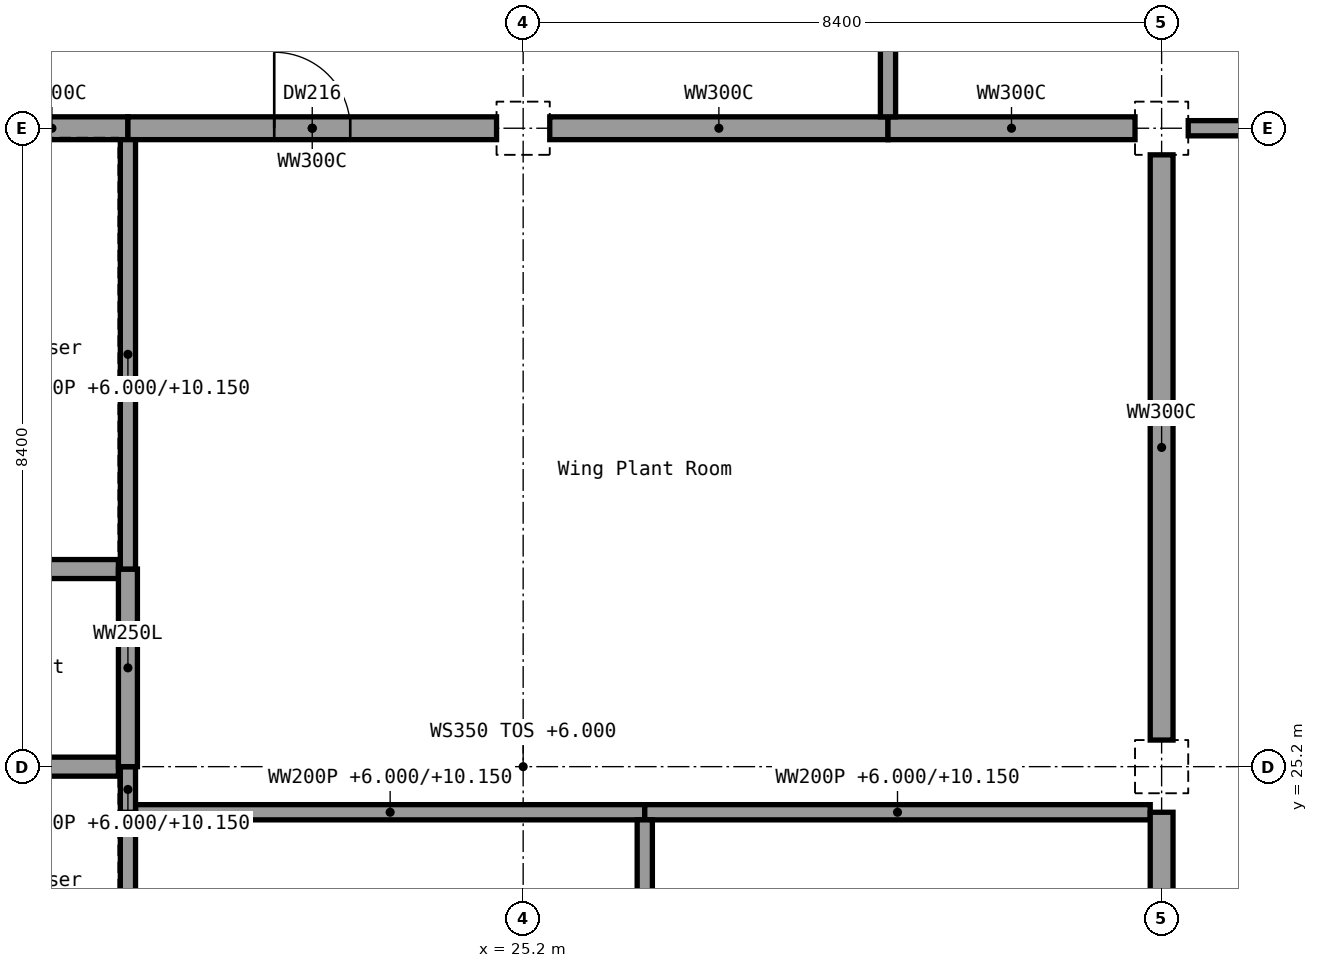
"""IFC4 building model, lengths in metres.
Left out: names, types, materials, properties, quantities, classifications, styles, units other than length and angle.
Written with IfcOpenShell. Run it as: python <this file> out.ifc"""

import sys

from ifc_helpers import new_model, si_unit, direction, frame, frame_2d, origin, origin_2d, place, context, subcontext, project, spatial, rectangle, extrude, element, fill, save


model = new_model("IFC4")
c1 = context("Model", 3, precision=1e-05, world=origin(), true_north=direction((0.0, 1.0)))
c2 = subcontext(c1, "Body", "Model", "MODEL_VIEW")
j1 = project(units=[si_unit("LENGTHUNIT", "METRE"), si_unit("PLANEANGLEUNIT", "RADIAN")], contexts=[c1])
p1 = place(None, origin())
s1 = spatial("IfcSite", under=j1, at=p1, CompositionType="ELEMENT")
p2 = place(p1, origin())
s2 = spatial("IfcBuilding", under=s1, at=p2, CompositionType="ELEMENT")
p3 = place(p2, frame((0.0, 0.0, 6.0)))
s3 = spatial("IfcBuildingStorey", under=s2, at=p3, CompositionType="ELEMENT", Elevation=6.0)
for number, where, z_axis, x_axis in (
    (1, (25.2, 33.6, 0.0), (0.0, 0.0, 1.0), (1.0, 0.0, 0.0)),
    (2, (33.6, 25.2, 0.0), (0.0, 0.0, 1.0), (1.0, 0.0, 0.0)),
    (3, (33.6, 33.6, 0.0), (0.0, 0.0, 1.0), (1.0, 0.0, 0.0)),
):
    element("IfcColumn", number, at=place(p3, frame(where, z_axis=z_axis, x_axis=x_axis)), inside=s3, PredefinedType="COLUMN", context=c2, shape_type="SweptSolid", body=[
        extrude(rectangle(XDim=0.7, YDim=0.7, at=origin_2d()), origin(), (0.0, 0.0, 1.0), 4.5),
    ])
p4 = place(p3, frame((20.1, 24.6, 0.0), z_axis=(0.0, 0.0, 1.0), x_axis=(1.0, 0.0, 0.0)))
e4 = element("IfcWall", 4, at=p4, inside=s3, PredefinedType="SOLIDWALL", context=c2, shape_type="SweptSolid", body=[
    extrude(rectangle(XDim=6.7, YDim=0.2, at=frame_2d((3.35, 0.0))), origin(), (0.0, 0.0, 1.0), 4.15),
])
p5 = place(p3, frame((26.8, 24.6, 0.0), z_axis=(0.0, 0.0, 1.0), x_axis=(1.0, 0.0, 0.0)))
e5 = element("IfcWall", 5, at=p5, inside=s3, PredefinedType="SOLIDWALL", context=c2, shape_type="SweptSolid", body=[
    extrude(rectangle(XDim=6.65, YDim=0.2, at=frame_2d((3.325, 0.0))), origin(), (0.0, 0.0, 1.0), 4.15),
])
p6 = place(p3, frame((17.15, 25.2, 0.0), z_axis=(0.0, 0.0, 1.0), x_axis=(1.0, 0.0, 0.0)))
e6 = element("IfcWall", 6, at=p6, inside=s3, PredefinedType="SHEAR", context=c2, shape_type="SweptSolid", body=[
    extrude(rectangle(XDim=2.725, YDim=0.25, at=frame_2d((1.363, 0.0))), origin(), (0.0, 0.0, 1.0), 4.15),
])
p7 = place(p3, frame((16.95, 27.8, 0.0), z_axis=(0.0, 0.0, 1.0), x_axis=(1.0, 0.0, 0.0)))
e7 = element("IfcWall", 7, at=p7, inside=s3, PredefinedType="SHEAR", context=c2, shape_type="SweptSolid", body=[
    extrude(rectangle(XDim=2.925, YDim=0.25, at=frame_2d((1.462, 0.0))), origin(), (0.0, 0.0, 1.0), 4.15),
])
p8 = place(p3, frame((18.0, 33.6, 0.0), z_axis=(0.0, 0.0, 1.0), x_axis=(1.0, 0.0, 0.0)))
e8 = element("IfcWall", 8, at=p8, inside=s3, PredefinedType="SHEAR", context=c2, shape_type="SweptSolid", body=[
    extrude(rectangle(XDim=2.0, YDim=0.3, at=frame_2d((1.0, 0.0))), origin(), (0.0, 0.0, 1.0), 4.15),
])
p9 = place(p3, frame((20.0, 33.6, 0.0), z_axis=(0.0, 0.0, 1.0), x_axis=(1.0, 0.0, 0.0)))
e9 = element("IfcWall", 9, at=p9, inside=s3, PredefinedType="SHEAR", context=c2, shape_type="SweptSolid", body=[
    extrude(rectangle(XDim=4.85, YDim=0.3, at=frame_2d((2.425, 0.0))), origin(), (0.0, 0.0, 1.0), 4.15),
])
p10 = place(p9, frame((1.925, 0.0, 0.0)))
e10 = element("IfcOpeningElement", 10, at=p10, cuts=e9, PredefinedType="OPENING", context=c2, shape_type="SweptSolid", body=[
    extrude(rectangle(XDim=1.0, YDim=2.1, at=frame_2d((0.5, 1.05))), frame((0.0, 0.15, 0.0), z_axis=(0.0, -1.0, 0.0), x_axis=(1.0, 0.0, 0.0)), (0.0, 0.0, 1.0), 0.3),
])
p11 = place(p3, frame((25.55, 33.6, 0.0), z_axis=(0.0, 0.0, 1.0), x_axis=(1.0, 0.0, 0.0)))
e11 = element("IfcWall", 11, at=p11, inside=s3, PredefinedType="SHEAR", context=c2, shape_type="SweptSolid", body=[
    extrude(rectangle(XDim=4.45, YDim=0.3, at=frame_2d((2.225, 0.0))), origin(), (0.0, 0.0, 1.0), 4.15),
])
p12 = place(p3, frame((30.0, 33.6, 0.0), z_axis=(0.0, 0.0, 1.0), x_axis=(1.0, 0.0, 0.0)))
e12 = element("IfcWall", 12, at=p12, inside=s3, PredefinedType="SHEAR", context=c2, shape_type="SweptSolid", body=[
    extrude(rectangle(XDim=3.25, YDim=0.3, at=frame_2d((1.625, 0.0))), origin(), (0.0, 0.0, 1.0), 4.15),
])
p13 = place(p3, frame((33.95, 33.6, 0.0), z_axis=(0.0, 0.0, 1.0), x_axis=(1.0, 0.0, 0.0)))
e13 = element("IfcWall", 13, at=p13, inside=s3, PredefinedType="SOLIDWALL", context=c2, shape_type="SweptSolid", body=[
    extrude(rectangle(XDim=4.95, YDim=0.2, at=frame_2d((2.475, 0.0))), origin(), (0.0, 0.0, 1.0), 3.55),
])
p14 = place(p3, frame((20.0, 22.2, 0.0), z_axis=(0.0, 0.0, 1.0), x_axis=(0.0, 1.0, 0.0)))
e14 = element("IfcWall", 14, at=p14, inside=s3, PredefinedType="SOLIDWALL", context=c2, shape_type="SweptSolid", body=[
    extrude(rectangle(XDim=2.4, YDim=0.2, at=frame_2d((1.2, 0.0))), origin(), (0.0, 0.0, 1.0), 4.15),
])
p15 = place(p3, frame((20.0, 24.6, 0.0), z_axis=(0.0, 0.0, 1.0), x_axis=(0.0, 1.0, 0.0)))
e15 = element("IfcWall", 15, at=p15, inside=s3, PredefinedType="SOLIDWALL", context=c2, shape_type="SweptSolid", body=[
    extrude(rectangle(XDim=0.6, YDim=0.2, at=frame_2d((0.3, 0.0))), origin(), (0.0, 0.0, 1.0), 4.15),
])
p16 = place(p3, frame((20.0, 25.2, 0.0), z_axis=(0.0, 0.0, 1.0), x_axis=(0.0, 1.0, 0.0)))
e16 = element("IfcWall", 16, at=p16, inside=s3, PredefinedType="SHEAR", context=c2, shape_type="SweptSolid", body=[
    extrude(rectangle(XDim=2.6, YDim=0.25, at=frame_2d((1.3, 0.0))), origin(), (0.0, 0.0, 1.0), 4.15),
])
p17 = place(p3, frame((20.0, 27.8, 0.0), z_axis=(0.0, 0.0, 1.0), x_axis=(0.0, 1.0, 0.0)))
e17 = element("IfcWall", 17, at=p17, inside=s3, PredefinedType="SOLIDWALL", context=c2, shape_type="SweptSolid", body=[
    extrude(rectangle(XDim=5.65, YDim=0.2, at=frame_2d((2.825, 0.0))), origin(), (0.0, 0.0, 1.0), 4.15),
])
p18 = place(p3, frame((26.8, 16.95, 0.0), z_axis=(0.0, 0.0, 1.0), x_axis=(0.0, 1.0, 0.0)))
e18 = element("IfcWall", 18, at=p18, inside=s3, PredefinedType="PARTITIONING", context=c2, shape_type="SweptSolid", body=[
    extrude(rectangle(XDim=7.55, YDim=0.2, at=frame_2d((3.775, 0.0))), origin(), (0.0, 0.0, 1.0), 4.15),
])
p19 = place(p3, frame((30.0, 33.75, 0.0), z_axis=(0.0, 0.0, 1.0), x_axis=(0.0, 1.0, 0.0)))
e19 = element("IfcWall", 19, at=p19, inside=s3, PredefinedType="SOLIDWALL", context=c2, shape_type="SweptSolid", body=[
    extrude(rectangle(XDim=5.15, YDim=0.2, at=frame_2d((2.575, 0.0))), origin(), (0.0, 0.0, 1.0), 4.15),
])
p20 = place(p3, frame((33.6, 19.8, 0.0), z_axis=(0.0, 0.0, 1.0), x_axis=(0.0, 1.0, 0.0)))
e20 = element("IfcWall", 20, at=p20, inside=s3, PredefinedType="SHEAR", context=c2, shape_type="SweptSolid", body=[
    extrude(rectangle(XDim=4.8, YDim=0.3, at=frame_2d((2.4, 0.0))), origin(), (0.0, 0.0, 1.0), 4.15),
])
p21 = place(p3, frame((33.6, 25.55, 0.0), z_axis=(0.0, 0.0, 1.0), x_axis=(0.0, 1.0, 0.0)))
e21 = element("IfcWall", 21, at=p21, inside=s3, PredefinedType="SHEAR", context=c2, shape_type="SweptSolid", body=[
    extrude(rectangle(XDim=7.7, YDim=0.3, at=frame_2d((3.85, 0.0))), origin(), (0.0, 0.0, 1.0), 4.15),
])
p22 = place(p10, origin())
e22 = element("IfcDoor", 22, at=p22, inside=s3, OperationType="SINGLE_SWING_LEFT", PredefinedType="DOOR", context=c2, shape_type="SweptSolid", body=[
    extrude(rectangle(XDim=1.0, YDim=2.1, at=frame_2d((0.5, 1.05))), frame((0.0, 0.025, 0.0), z_axis=(0.0, -1.0, 0.0), x_axis=(1.0, 0.0, 0.0)), (0.0, 0.0, 1.0), 0.05),
])
fill(e10, e22)
save(model, sys.argv[1])
